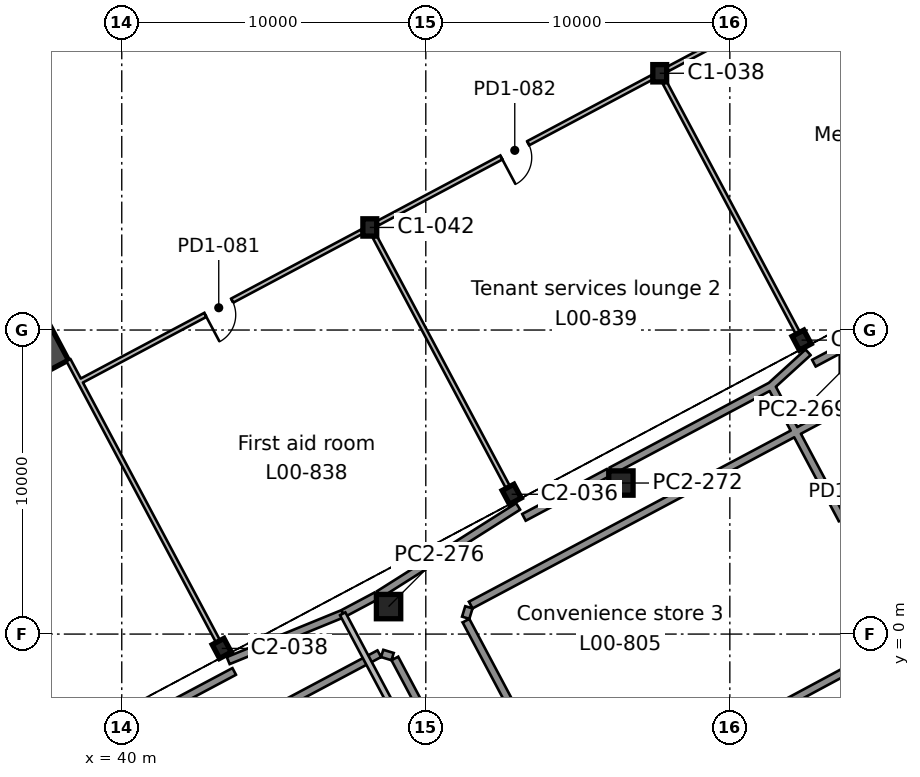
"""IFC4 building model, lengths in metres.
Left out: names, types, materials, properties, quantities, classifications, styles, units other than length and angle.
Written with IfcOpenShell. Run it as: python <this file> out.ifc"""

import sys

from ifc_helpers import new_model, si_unit, direction, frame, frame_2d, origin, origin_2d, place, context, subcontext, project, spatial, rectangle, i_section, extrude, element, fill, save


model = new_model("IFC4")
c1 = context("Model", 3, precision=1e-05, world=origin(), true_north=direction((0.0, 1.0)))
c2 = subcontext(c1, "Body", "Model", "MODEL_VIEW")
j1 = project(units=[si_unit("LENGTHUNIT", "METRE"), si_unit("PLANEANGLEUNIT", "RADIAN")], contexts=[c1])
p1 = place(None, origin())
s1 = spatial("IfcSite", under=j1, at=p1, CompositionType="ELEMENT")
p2 = place(p1, origin())
s2 = spatial("IfcBuilding", under=s1, at=p2, CompositionType="ELEMENT")
p3 = place(p2, origin())
s3 = spatial("IfcBuildingStorey", under=s2, at=p3, CompositionType="ELEMENT", Elevation=0.0)
for number, where, z_axis, x_axis in (
    (1, (43.289, -0.472, 0.0), (0.0, 0.0, 1.0), (0.883, 0.469, 0.0)),
    (2, (52.825, 4.598, 0.0), (0.0, 0.0, 1.0), (0.883, 0.469, 0.0)),
    (3, (62.361, 9.668, 0.0), (0.0, 0.0, 1.0), (0.883, 0.469, 0.0)),
):
    element("IfcColumn", number, at=place(p3, frame(where, z_axis=z_axis, x_axis=x_axis)), inside=s3, PredefinedType="COLUMN", context=c2, shape_type="SweptSolid", body=[
        extrude(i_section(OverallWidth=0.437, OverallDepth=0.513, WebThickness=0.061, FlangeThickness=0.097, FilletRadius=0.015, at=origin_2d()), origin(), (0.0, 0.0, 1.0), 7.0),
    ])
for number, where, z_axis, x_axis in (
    (4, (48.158, 13.374, 0.0), (0.0, 0.0, 1.0), (1.0, 0.0, 0.0)),
    (5, (57.694, 18.445, 0.0), (0.0, 0.0, 1.0), (1.0, 0.0, 0.0)),
):
    element("IfcColumn", number, at=place(p3, frame(where, z_axis=z_axis, x_axis=x_axis)), inside=s3, PredefinedType="COLUMN", context=c2, shape_type="SweptSolid", body=[
        extrude(i_section(OverallWidth=0.455, OverallDepth=0.569, WebThickness=0.078, FlangeThickness=0.125, FilletRadius=0.015, at=origin_2d()), origin(), (0.0, 0.0, 1.0), 7.0),
    ])
p4 = place(p3, frame((37.849, 8.799, 0.0), z_axis=(0.0, 0.0, 1.0), x_axis=(-0.469465789982, 0.882950662289, 0.0)))
e6 = element("IfcWall", 6, at=p4, inside=s3, PredefinedType="SHEAR", context=c2, shape_type="SweptSolid", body=[
    extrude(rectangle(XDim=20.0, YDim=0.9, at=frame_2d((10.0, 0.0))), origin(), (0.0, 0.0, 1.0), 7.0),
])
p5 = place(p4, frame((10.6, 0.0, 0.0)))
e7 = element("IfcOpeningElement", 7, at=p5, cuts=e6, PredefinedType="OPENING", context=c2, shape_type="SweptSolid", body=[
    extrude(rectangle(XDim=2.4, YDim=2.4, at=frame_2d((1.2, 1.2))), frame((0.0, 0.46, 0.0), z_axis=(0.0, -1.0, 0.0), x_axis=(1.0, 0.0, 0.0)), (0.0, 0.0, 1.0), 0.92),
])
for number, where, z_axis, x_axis in (
    (8, (48.775, 0.904, 0.0), (0.0, 0.0, 1.0), (1.0, 0.0, 0.0)),
    (9, (56.417, 4.968, 0.0), (0.0, 0.0, 1.0), (1.0, 0.0, 0.0)),
):
    element("IfcColumn", number, at=place(p3, frame(where, z_axis=z_axis, x_axis=x_axis)), inside=s3, PredefinedType="COLUMN", context=c2, shape_type="SweptSolid", body=[
        extrude(rectangle(XDim=0.8, YDim=0.8, at=origin_2d()), origin(), (0.0, 0.0, 1.0), 6.37),
    ])
p6 = place(p3, frame((33.134, -8.8, 7.0), z_axis=(0.0, 0.0, 1.0), x_axis=(0.882946405611, 0.469473795667, 0.0)))
e10 = element("IfcWall", 10, at=p6, inside=s3, PredefinedType="STANDARD", context=c2, shape_type="SweptSolid", body=[
    extrude(rectangle(XDim=17.368, YDim=0.25, at=frame_2d((8.684, 0.0))), origin(), (0.0, 0.0, 1.0), 0.65),
])
p7 = place(p3, frame((48.565, -0.636, 7.0), z_axis=(0.0, 0.0, 1.0), x_axis=(0.956161046089, -0.292841346024, 0.0)))
e11 = element("IfcWall", 11, at=p7, inside=s3, PredefinedType="STANDARD", context=c2, shape_type="SweptSolid", body=[
    extrude(rectangle(XDim=0.358, YDim=0.25, at=frame_2d((0.179, 0.0))), origin(), (0.0, 0.0, 1.0), 0.65),
])
p8 = place(p3, frame((48.982, -0.802, 7.0), z_axis=(0.0, 0.0, 1.0), x_axis=(0.469473426487, -0.882946601909, 0.0)))
e12 = element("IfcWall", 12, at=p8, inside=s3, PredefinedType="STANDARD", context=c2, shape_type="SweptSolid", body=[
    extrude(rectangle(XDim=6.993, YDim=0.25, at=frame_2d((3.497, 0.0))), origin(), (0.0, 0.0, 1.0), 0.65),
])
p9 = place(p3, frame((79.199, 7.048, 7.0), z_axis=(0.0, 0.0, 1.0), x_axis=(-0.880943825578, -0.473220853488, 0.0)))
e13 = element("IfcWall", 13, at=p9, inside=s3, PredefinedType="STANDARD", context=c2, shape_type="SweptSolid", body=[
    extrude(rectangle(XDim=27.337, YDim=0.25, at=frame_2d((13.668, 0.0))), origin(), (0.0, 0.0, 1.0), 0.65),
])
p10 = place(p3, frame((54.604, -5.732, 7.0), z_axis=(0.0, 0.0, 1.0), x_axis=(-0.46950064371, 0.882932129643, 0.0)))
e14 = element("IfcWall", 14, at=p10, inside=s3, PredefinedType="STANDARD", context=c2, shape_type="SweptSolid", body=[
    extrude(rectangle(XDim=6.993, YDim=0.25, at=frame_2d((3.497, 0.0))), origin(), (0.0, 0.0, 1.0), 0.65),
])
p11 = place(p3, frame((51.312, 0.537, 7.0), z_axis=(0.0, 0.0, 1.0), x_axis=(0.2920282937, 0.956409679833, 0.0)))
e15 = element("IfcWall", 15, at=p11, inside=s3, PredefinedType="STANDARD", context=c2, shape_type="SweptSolid", body=[
    extrude(rectangle(XDim=0.359, YDim=0.25, at=frame_2d((0.179, 0.0))), origin(), (0.0, 0.0, 1.0), 0.65),
])
p12 = place(p3, frame((51.478, 0.954, 7.0), z_axis=(0.0, 0.0, 1.0), x_axis=(0.88290924417, 0.469543679075, 0.0)))
e16 = element("IfcWall", 16, at=p12, inside=s3, PredefinedType="STANDARD", context=c2, shape_type="SweptSolid", body=[
    extrude(rectangle(XDim=23.081, YDim=0.25, at=frame_2d((11.541, 0.0))), origin(), (0.0, 0.0, 1.0), 0.65),
])
p13 = place(p3, frame((52.063, -8.353, 0.0), z_axis=(0.0, 0.0, 1.0), x_axis=(-0.469467926311, 0.882949526397, 0.0)))
e17 = element("IfcWall", 17, at=p13, inside=s3, PredefinedType="PARTITIONING", context=c2, shape_type="SweptSolid", body=[
    extrude(rectangle(XDim=10.217, YDim=0.2, at=frame_2d((5.109, 0.0))), origin(), (0.0, 0.0, 1.0), 6.37),
])
p14 = place(p3, frame((47.27, 0.67, 0.0), z_axis=(0.0, 0.0, 1.0), x_axis=(-0.925490593681, -0.378770591531, 0.0)))
e18 = element("IfcWall", 18, at=p14, inside=s3, PredefinedType="SOLIDWALL", context=c2, shape_type="SweptSolid", body=[
    extrude(rectangle(XDim=4.072, YDim=0.25, at=frame_2d((2.036, 0.0))), origin(), (0.0, 0.0, 1.0), 6.37),
])
p15 = place(p3, frame((43.699, -1.229, 0.0), z_axis=(0.0, 0.0, 1.0), x_axis=(-0.882959571528, -0.469449033492, 0.0)))
e19 = element("IfcWall", 19, at=p15, inside=s3, PredefinedType="SOLIDWALL", context=c2, shape_type="SweptSolid", body=[
    extrude(rectangle(XDim=3.26, YDim=0.25, at=frame_2d((1.63, 0.0))), origin(), (0.0, 0.0, 1.0), 6.37),
])
p16 = place(p3, frame((66.523, -1.551, 0.0), z_axis=(0.0, 0.0, 1.0), x_axis=(-0.469471626463, 0.882947559001, 0.0)))
e20 = element("IfcWall", 20, at=p16, inside=s3, PredefinedType="SOLIDWALL", context=c2, shape_type="SweptSolid", body=[
    extrude(rectangle(XDim=11.0, YDim=0.25, at=frame_2d((5.5, 0.0))), origin(), (0.0, 0.0, 1.0), 6.37),
])
p17 = place(p16, frame((5.0, 0.0, 0.0)))
e21 = element("IfcOpeningElement", 21, at=p17, cuts=e20, PredefinedType="OPENING", context=c2, shape_type="SweptSolid", body=[
    extrude(rectangle(XDim=1.0, YDim=2.1, at=frame_2d((0.5, 1.05))), frame((0.0, 0.135, 0.0), z_axis=(0.0, -1.0, 0.0), x_axis=(1.0, 0.0, 0.0)), (0.0, 0.0, 1.0), 0.27),
])
p18 = place(p3, frame((53.037, 4.198, 0.0), z_axis=(0.0, 0.0, 1.0), x_axis=(-0.845143693755, -0.534539181825, 0.0)))
e22 = element("IfcWall", 22, at=p18, inside=s3, PredefinedType="SOLIDWALL", context=c2, shape_type="SweptSolid", body=[
    extrude(rectangle(XDim=5.414, YDim=0.25, at=frame_2d((2.707, 0.0))), origin(), (0.0, 0.0, 1.0), 6.37),
])
p19 = place(p3, frame((48.375, 1.258, 0.0), z_axis=(0.0, 0.0, 1.0), x_axis=(-0.883006084416, -0.469361539631, 0.0)))
e23 = element("IfcWall", 23, at=p19, inside=s3, PredefinedType="SOLIDWALL", context=c2, shape_type="SweptSolid", body=[
    extrude(rectangle(XDim=1.24, YDim=0.25, at=frame_2d((0.62, 0.0))), origin(), (0.0, 0.0, 1.0), 6.37),
])
p20 = place(p3, frame((61.363, 8.164, 0.0), z_axis=(0.0, 0.0, 1.0), x_axis=(-0.882945796858, -0.469474940556, 0.0)))
e24 = element("IfcWall", 24, at=p20, inside=s3, PredefinedType="SOLIDWALL", context=c2, shape_type="SweptSolid", body=[
    extrude(rectangle(XDim=5.955, YDim=0.25, at=frame_2d((2.978, 0.0))), origin(), (0.0, 0.0, 1.0), 6.37),
])
p21 = place(p3, frame((56.017, 5.321, 0.0), z_axis=(0.0, 0.0, 1.0), x_axis=(-0.882921481106, -0.469520668555, 0.0)))
e25 = element("IfcWall", 25, at=p21, inside=s3, PredefinedType="SOLIDWALL", context=c2, shape_type="SweptSolid", body=[
    extrude(rectangle(XDim=3.158, YDim=0.25, at=frame_2d((1.579, 0.0))), origin(), (0.0, 0.0, 1.0), 6.37),
])
p22 = place(p3, frame((62.573, 9.268, 0.0), z_axis=(0.0, 0.0, 1.0), x_axis=(-0.739544046234, -0.673108166404, 0.0)))
e26 = element("IfcWall", 26, at=p22, inside=s3, PredefinedType="SOLIDWALL", context=c2, shape_type="SweptSolid", body=[
    extrude(rectangle(XDim=1.646, YDim=0.25, at=frame_2d((0.823, 0.0))), origin(), (0.0, 0.0, 1.0), 6.37),
])
p23 = place(p3, frame((63.659, 9.385, 0.0), z_axis=(0.0, 0.0, 1.0), x_axis=(-0.882866012348, -0.469624961263, 0.0)))
e27 = element("IfcWall", 27, at=p23, inside=s3, PredefinedType="SOLIDWALL", context=c2, shape_type="SweptSolid", body=[
    extrude(rectangle(XDim=1.013, YDim=0.25, at=frame_2d((0.507, 0.0))), origin(), (0.0, 0.0, 1.0), 6.37),
])
p24 = place(p3, frame((38.622, 8.304, 0.0), z_axis=(0.0, 0.0, 1.0), x_axis=(0.882956451437, 0.469454901845, 0.0)))
e28 = element("IfcWall", 28, at=p24, inside=s3, PredefinedType="PARTITIONING", context=c2, shape_type="SweptSolid", body=[
    extrude(rectangle(XDim=10.502, YDim=0.15, at=frame_2d((5.251, 0.0))), origin(), (0.0, 0.0, 1.0), 6.55),
])
p25 = place(p24, frame((4.673, 0.0, 0.0)))
e29 = element("IfcOpeningElement", 29, at=p25, cuts=e28, PredefinedType="OPENING", context=c2, shape_type="SweptSolid", body=[
    extrude(rectangle(XDim=1.0, YDim=2.1, at=frame_2d((0.5, 1.05))), frame((0.0, 0.085, 0.0), z_axis=(0.0, -1.0, 0.0), x_axis=(1.0, 0.0, 0.0)), (0.0, 0.0, 1.0), 0.17),
])
p26 = place(p3, frame((48.421, 13.514, 0.0), z_axis=(0.0, 0.0, 1.0), x_axis=(0.882940965658, 0.469484026526, 0.0)))
e30 = element("IfcWall", 30, at=p26, inside=s3, PredefinedType="PARTITIONING", context=c2, shape_type="SweptSolid", body=[
    extrude(rectangle(XDim=10.205, YDim=0.15, at=frame_2d((5.103, 0.0))), origin(), (0.0, 0.0, 1.0), 6.55),
])
p27 = place(p26, frame((4.603, 0.0, 0.0)))
e31 = element("IfcOpeningElement", 31, at=p27, cuts=e30, PredefinedType="OPENING", context=c2, shape_type="SweptSolid", body=[
    extrude(rectangle(XDim=1.0, YDim=2.1, at=frame_2d((0.5, 1.05))), frame((0.0, 0.085, 0.0), z_axis=(0.0, -1.0, 0.0), x_axis=(1.0, 0.0, 0.0)), (0.0, 0.0, 1.0), 0.17),
])
p28 = place(p3, frame((57.957, 18.584, 0.0), z_axis=(0.0, 0.0, 1.0), x_axis=(0.882944872937, 0.469476678179, 0.0)))
e32 = element("IfcWall", 32, at=p28, inside=s3, PredefinedType="PARTITIONING", context=c2, shape_type="SweptSolid", body=[
    extrude(rectangle(XDim=11.586, YDim=0.15, at=frame_2d((5.793, 0.0))), origin(), (0.0, 0.0, 1.0), 6.55),
])
p29 = place(p28, frame((5.273, 0.0, 0.0)))
e33 = element("IfcOpeningElement", 33, at=p29, cuts=e32, PredefinedType="OPENING", context=c2, shape_type="SweptSolid", body=[
    extrude(rectangle(XDim=1.0, YDim=2.1, at=frame_2d((0.5, 1.05))), frame((0.0, 0.085, 0.0), z_axis=(0.0, -1.0, 0.0), x_axis=(1.0, 0.0, 0.0)), (0.0, 0.0, 1.0), 0.17),
])
p30 = place(p3, frame((38.247, 9.01, 0.0), z_axis=(0.0, 0.0, 1.0), x_axis=(0.469454908155, -0.882956448082, 0.0)))
e34 = element("IfcWall", 34, at=p30, inside=s3, PredefinedType="PARTITIONING", context=c2, shape_type="SweptSolid", body=[
    extrude(rectangle(XDim=0.794, YDim=0.15, at=frame_2d((0.397, 0.0))), origin(), (0.0, 0.0, 1.0), 6.55),
])
p31 = place(p3, frame((52.704, 4.824, 0.0), z_axis=(0.0, 0.0, 1.0), x_axis=(-0.469494001944, 0.882935661381, 0.0)))
e35 = element("IfcWall", 35, at=p31, inside=s3, PredefinedType="PARTITIONING", context=c2, shape_type="SweptSolid", body=[
    extrude(rectangle(XDim=9.325, YDim=0.15, at=frame_2d((4.663, 0.0))), origin(), (0.0, 0.0, 1.0), 6.55),
])
p32 = place(p3, frame((38.62, 8.308, 0.0), z_axis=(0.0, 0.0, 1.0), x_axis=(0.469473365889, -0.882946634129, 0.0)))
e36 = element("IfcWall", 36, at=p32, inside=s3, PredefinedType="PARTITIONING", context=c2, shape_type="SweptSolid", body=[
    extrude(rectangle(XDim=9.687, YDim=0.15, at=frame_2d((4.844, 0.0))), origin(), (0.0, 0.0, 1.0), 6.55),
])
p33 = place(p3, frame((62.24, 9.894, 0.0), z_axis=(0.0, 0.0, 1.0), x_axis=(-0.469471003187, 0.882947890403, 0.0)))
e37 = element("IfcWall", 37, at=p33, inside=s3, PredefinedType="PARTITIONING", context=c2, shape_type="SweptSolid", body=[
    extrude(rectangle(XDim=9.326, YDim=0.15, at=frame_2d((4.663, 0.0))), origin(), (0.0, 0.0, 1.0), 6.55),
])
p34 = place(p25, frame((1.0, 0.0, 0.0), z_axis=(0.0, 0.0, 1.0), x_axis=(-1.0, 0.0, 0.0)))
e38 = element("IfcDoor", 38, at=p34, inside=s3, OperationType="SINGLE_SWING_RIGHT", PredefinedType="DOOR", context=c2, shape_type="SweptSolid", body=[
    extrude(rectangle(XDim=1.0, YDim=2.1, at=frame_2d((0.5, 1.05))), frame((0.0, 0.025, 0.0), z_axis=(0.0, -1.0, 0.0), x_axis=(1.0, 0.0, 0.0)), (0.0, 0.0, 1.0), 0.05),
])
fill(e29, e38)
p35 = place(p27, frame((1.0, 0.0, 0.0), z_axis=(0.0, 0.0, 1.0), x_axis=(-1.0, 0.0, 0.0)))
e39 = element("IfcDoor", 39, at=p35, inside=s3, OperationType="SINGLE_SWING_RIGHT", PredefinedType="DOOR", context=c2, shape_type="SweptSolid", body=[
    extrude(rectangle(XDim=1.0, YDim=2.1, at=frame_2d((0.5, 1.05))), frame((0.0, 0.025, 0.0), z_axis=(0.0, -1.0, 0.0), x_axis=(1.0, 0.0, 0.0)), (0.0, 0.0, 1.0), 0.05),
])
fill(e31, e39)
save(model, sys.argv[1])
